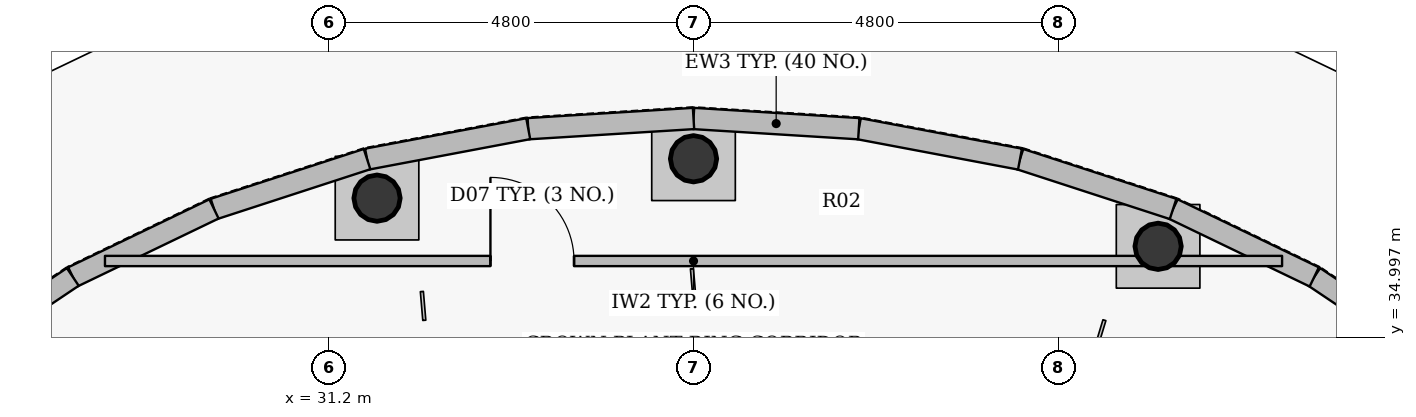
"""IFC4 building model, lengths in metres.
Left out: names, types, materials, properties, quantities, classifications, styles, units other than length and angle.
Written with IfcOpenShell. Run it as: python <this file> out.ifc"""

import sys

from ifc_helpers import new_model, si_unit, direction, frame, frame_2d, origin, origin_2d, place, context, subcontext, project, spatial, rectangle, hollow_circle, extrude, source, transform, mapped, element, fill, save


model = new_model("IFC4")
c1 = context("Model", 3, precision=1e-05, world=origin(), true_north=direction((0.0, 1.0)))
c2 = subcontext(c1, "Body", "Model", "MODEL_VIEW")
j1 = project(units=[si_unit("LENGTHUNIT", "METRE"), si_unit("PLANEANGLEUNIT", "RADIAN")], contexts=[c1])
p1 = place(None, origin())
s1 = spatial("IfcSite", under=j1, at=p1, CompositionType="ELEMENT")
p2 = place(p1, origin())
s2 = spatial("IfcBuilding", under=s1, at=p2, CompositionType="ELEMENT")
p3 = place(p2, frame((0.0, 0.0, 368.4)))
s3 = spatial("IfcBuildingStorey", under=s2, at=p3, CompositionType="ELEMENT", Elevation=368.4)
for number, where, z_axis, x_axis in (
    (1, (42.113, 36.193, -0.3), (0.0, 0.0, 1.0), (1.0, 0.0, 0.0)),
    (2, (36.0, 37.345, -0.3), (0.0, 0.0, 1.0), (1.0, 0.0, 0.0)),
    (3, (31.836, 36.827, -0.3), (0.0, 0.0, 1.0), (1.0, 0.0, 0.0)),
):
    element("IfcColumn", number, at=place(p3, frame(where, z_axis=z_axis, x_axis=x_axis)), inside=s3, PredefinedType="COLUMN", context=c2, shape_type="SweptSolid", body=[
        extrude(hollow_circle(Radius=0.305, WallThickness=0.025, at=origin_2d()), origin(), (0.0, 0.0, 1.0), 4.8),
    ])
p4 = place(p3, frame((44.167, 35.791, 0.0), z_axis=(0.0, 0.0, 1.0), x_axis=(0.830407326996, -0.557156774411, 0.0)))
e4 = element("IfcWall", 4, at=p4, inside=s3, PredefinedType="SOLIDWALL", context=c2, shape_type="SweptSolid", body=[
    extrude(rectangle(XDim=1.993, YDim=0.28, at=frame_2d((0.997, 0.0))), origin(), (0.0, 0.0, 1.0), 4.5),
])
p5 = place(p3, frame((42.309, 36.685, 0.0), z_axis=(0.0, 0.0, 1.0), x_axis=(0.900982812949, -0.433854780739, 0.0)))
e5 = element("IfcWall", 5, at=p5, inside=s3, PredefinedType="SOLIDWALL", context=c2, shape_type="SweptSolid", body=[
    extrude(rectangle(XDim=2.062, YDim=0.28, at=frame_2d((1.031, 0.0))), origin(), (0.0, 0.0, 1.0), 4.5),
])
p6 = place(p3, frame((40.295, 37.341, 0.0), z_axis=(0.0, 0.0, 1.0), x_axis=(0.950895892553, -0.309510906959, 0.0)))
e6 = element("IfcWall", 6, at=p6, inside=s3, PredefinedType="SOLIDWALL", context=c2, shape_type="SweptSolid", body=[
    extrude(rectangle(XDim=2.118, YDim=0.28, at=frame_2d((1.059, 0.0))), origin(), (0.0, 0.0, 1.0), 4.5),
])
p7 = place(p3, frame((38.175, 37.74, 0.0), z_axis=(0.0, 0.0, 1.0), x_axis=(0.982683423472, -0.18529244246, 0.0)))
e7 = element("IfcWall", 7, at=p7, inside=s3, PredefinedType="SOLIDWALL", context=c2, shape_type="SweptSolid", body=[
    extrude(rectangle(XDim=2.158, YDim=0.28, at=frame_2d((1.079, 0.0))), origin(), (0.0, 0.0, 1.0), 4.5),
])
for number, where, z_axis, x_axis in (
    (8, (36.0, 37.875, 0.0), (0.0, 0.0, 1.0), (0.998, -0.062, 0.0)),
    (9, (33.825, 37.74, 0.0), (0.0, 0.0, 1.0), (0.998, 0.062, 0.0)),
):
    element("IfcWall", number, at=place(p3, frame(where, z_axis=z_axis, x_axis=x_axis)), inside=s3, PredefinedType="SOLIDWALL", context=c2, shape_type="SweptSolid", body=[
        extrude(rectangle(XDim=2.179, YDim=0.28, at=frame_2d((1.089, 0.0))), origin(), (0.0, 0.0, 1.0), 4.5),
    ])
p8 = place(p3, frame((31.705, 37.341, 0.0), z_axis=(0.0, 0.0, 1.0), x_axis=(0.982683423472, 0.18529244246, 0.0)))
e10 = element("IfcWall", 10, at=p8, inside=s3, PredefinedType="SOLIDWALL", context=c2, shape_type="SweptSolid", body=[
    extrude(rectangle(XDim=2.158, YDim=0.28, at=frame_2d((1.079, 0.0))), origin(), (0.0, 0.0, 1.0), 4.5),
])
p9 = place(p3, frame((29.691, 36.685, 0.0), z_axis=(0.0, 0.0, 1.0), x_axis=(0.950895892553, 0.309510906959, 0.0)))
e11 = element("IfcWall", 11, at=p9, inside=s3, PredefinedType="SOLIDWALL", context=c2, shape_type="SweptSolid", body=[
    extrude(rectangle(XDim=2.118, YDim=0.28, at=frame_2d((1.059, 0.0))), origin(), (0.0, 0.0, 1.0), 4.5),
])
p10 = place(p3, frame((27.833, 35.791, 0.0), z_axis=(0.0, 0.0, 1.0), x_axis=(0.900982812949, 0.433854780739, 0.0)))
e12 = element("IfcWall", 12, at=p10, inside=s3, PredefinedType="SOLIDWALL", context=c2, shape_type="SweptSolid", body=[
    extrude(rectangle(XDim=2.062, YDim=0.28, at=frame_2d((1.031, 0.0))), origin(), (0.0, 0.0, 1.0), 4.5),
])
p11 = place(p3, frame((26.178, 34.68, 0.0), z_axis=(0.0, 0.0, 1.0), x_axis=(0.830407326996, 0.557156774411, 0.0)))
e13 = element("IfcWall", 13, at=p11, inside=s3, PredefinedType="SOLIDWALL", context=c2, shape_type="SweptSolid", body=[
    extrude(rectangle(XDim=1.993, YDim=0.28, at=frame_2d((0.997, 0.0))), origin(), (0.0, 0.0, 1.0), 4.5),
])
p12 = place(p3, frame((28.256, 36.0, 0.0), z_axis=(0.0, 0.0, 1.0), x_axis=(1.0, 0.0, 0.0)))
e14 = element("IfcWall", 14, at=p12, inside=s3, PredefinedType="PARTITIONING", context=c2, shape_type="SweptSolid", body=[
    extrude(rectangle(XDim=15.487, YDim=0.135, at=frame_2d((7.744, 0.0))), origin(), (0.0, 0.0, 1.0), 3.985),
])
p13 = place(p12, frame((5.072, 0.0, 0.0)))
e15 = element("IfcOpeningElement", 15, at=p13, cuts=e14, PredefinedType="OPENING", context=c2, shape_type="SweptSolid", body=[
    extrude(rectangle(XDim=1.1, YDim=2.15, at=origin_2d()), frame((0.55, 0.078, 1.075), z_axis=(0.0, -1.0, 0.0), x_axis=(1.0, 0.0, 0.0)), (0.0, 0.0, 1.0), 0.155),
])
m1 = source(origin(), c2, "Body", "SweptSolid", [
    extrude(rectangle(XDim=1.1, YDim=2.15, at=origin_2d()), frame((0.55, 0.025, 1.075), z_axis=(0.0, -1.0, 0.0), x_axis=(1.0, 0.0, 0.0)), (0.0, 0.0, 1.0), 0.05),
])
p14 = place(p13, origin())
e16 = element("IfcDoor", 16, at=p14, inside=s3, OperationType="SINGLE_SWING_LEFT", PredefinedType="DOOR", context=c2, shape_type="MappedRepresentation", body=[
    mapped(m1, transform((0.0, 0.0, 0.0), x_axis=(1.0, 0.0, 0.0), y_axis=(0.0, 1.0, 0.0), z_axis=(0.0, 0.0, 1.0), scale=1.0)),
])
fill(e15, e16)
save(model, sys.argv[1])
